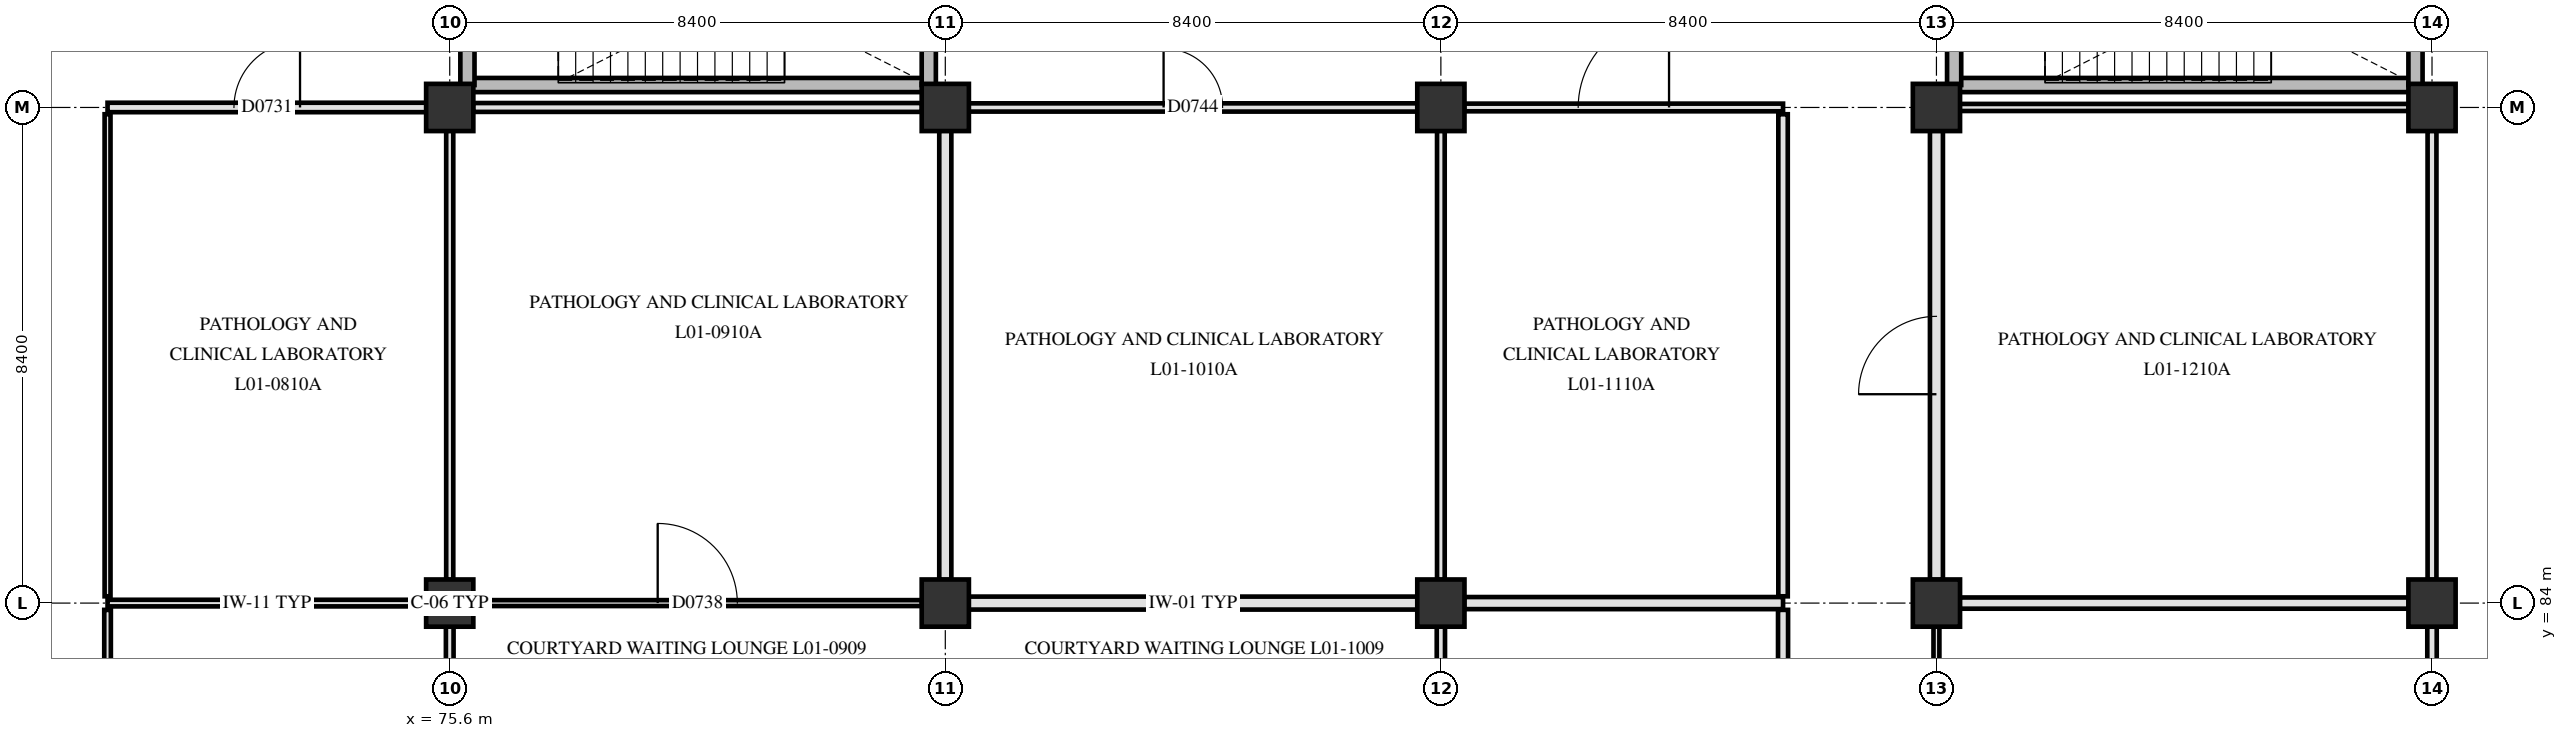
"""IFC4 building model, lengths in metres.
Left out: names, types, materials, properties, quantities, classifications, styles, units other than length and angle.
Written with IfcOpenShell. Run it as: python <this file> out.ifc"""

import sys

from ifc_helpers import new_model, si_unit, direction, frame, frame_2d, origin, origin_2d, place, context, subcontext, project, spatial, rectangle, circle, extrude, element, fill, save


model = new_model("IFC4")
c1 = context("Model", 3, precision=1e-05, world=origin(), true_north=direction((0.0, 1.0)))
c2 = subcontext(c1, "Body", "Model", "MODEL_VIEW")
j1 = project(units=[si_unit("LENGTHUNIT", "METRE"), si_unit("PLANEANGLEUNIT", "RADIAN")], contexts=[c1])
p1 = place(None, origin())
s1 = spatial("IfcSite", under=j1, at=p1, CompositionType="ELEMENT")
p2 = place(p1, origin())
s2 = spatial("IfcBuilding", under=s1, at=p2, CompositionType="ELEMENT")
p3 = place(p2, frame((0.0, 0.0, 4.8)))
s3 = spatial("IfcBuildingStorey", under=s2, at=p3, CompositionType="ELEMENT", Elevation=4.8)
p4 = place(p3, frame((75.6, 84.0, 0.0), z_axis=(0.0, 0.0, 1.0), x_axis=(1.0, 0.0, 0.0)))
e1 = element("IfcColumn", 1, at=p4, inside=s3, PredefinedType="COLUMN", context=c2, shape_type="SweptSolid", body=[
    extrude(circle(Radius=0.4, at=origin_2d()), origin(), (0.0, 0.0, 1.0), 4.5),
])
p5 = place(p3, frame((75.6, 92.4, 0.0), z_axis=(0.0, 0.0, 1.0), x_axis=(1.0, 0.0, 0.0)))
e2 = element("IfcColumn", 2, at=p5, inside=s3, PredefinedType="COLUMN", context=c2, shape_type="SweptSolid", body=[
    extrude(rectangle(XDim=0.8, YDim=0.8, at=origin_2d()), origin(), (0.0, 0.0, 1.0), 4.5),
])
p6 = place(p3, frame((84.0, 84.0, 0.0), z_axis=(0.0, 0.0, 1.0), x_axis=(1.0, 0.0, 0.0)))
e3 = element("IfcColumn", 3, at=p6, inside=s3, PredefinedType="COLUMN", context=c2, shape_type="SweptSolid", body=[
    extrude(circle(Radius=0.4, at=origin_2d()), origin(), (0.0, 0.0, 1.0), 4.5),
])
p7 = place(p3, frame((84.0, 92.4, 0.0), z_axis=(0.0, 0.0, 1.0), x_axis=(1.0, 0.0, 0.0)))
e4 = element("IfcColumn", 4, at=p7, inside=s3, PredefinedType="COLUMN", context=c2, shape_type="SweptSolid", body=[
    extrude(rectangle(XDim=0.8, YDim=0.8, at=origin_2d()), origin(), (0.0, 0.0, 1.0), 4.5),
])
p8 = place(p3, frame((92.4, 84.0, 0.0), z_axis=(0.0, 0.0, 1.0), x_axis=(1.0, 0.0, 0.0)))
e5 = element("IfcColumn", 5, at=p8, inside=s3, PredefinedType="COLUMN", context=c2, shape_type="SweptSolid", body=[
    extrude(circle(Radius=0.4, at=origin_2d()), origin(), (0.0, 0.0, 1.0), 4.5),
])
for number, where, z_axis, x_axis in (
    (6, (92.4, 92.4, 0.0), (0.0, 0.0, 1.0), (1.0, 0.0, 0.0)),
    (7, (100.8, 84.0, 0.0), (0.0, 0.0, 1.0), (1.0, 0.0, 0.0)),
    (8, (100.8, 92.4, 0.0), (0.0, 0.0, 1.0), (1.0, 0.0, 0.0)),
    (9, (109.2, 84.0, 0.0), (0.0, 0.0, 1.0), (1.0, 0.0, 0.0)),
    (10, (109.2, 92.4, 0.0), (0.0, 0.0, 1.0), (1.0, 0.0, 0.0)),
):
    element("IfcColumn", number, at=place(p3, frame(where, z_axis=z_axis, x_axis=x_axis)), inside=s3, PredefinedType="COLUMN", context=c2, shape_type="SweptSolid", body=[
        extrude(rectangle(XDim=0.8, YDim=0.8, at=origin_2d()), origin(), (0.0, 0.0, 1.0), 4.5),
    ])
p9 = place(p3, frame((101.1, 92.78, 0.0), z_axis=(0.0, 0.0, 1.0), x_axis=(1.0, 0.0, 0.0)))
e11 = element("IfcWall", 11, at=p9, inside=s3, PredefinedType="SHEAR", context=c2, shape_type="SweptSolid", body=[
    extrude(rectangle(XDim=7.82, YDim=0.24, at=frame_2d((3.91, 0.0))), origin(), (0.0, 0.0, 1.0), 4.15),
])
for number, where, z_axis, x_axis in (
    (12, (101.1, 92.78, 0.0), (0.0, 0.0, 1.0), (0.0, 1.0, 0.0)),
    (13, (108.92, 92.78, 0.0), (0.0, 0.0, 1.0), (0.0, 1.0, 0.0)),
):
    element("IfcWall", number, at=place(p3, frame(where, z_axis=z_axis, x_axis=x_axis)), inside=s3, PredefinedType="SHEAR", context=c2, shape_type="SweptSolid", body=[
        extrude(rectangle(XDim=3.32, YDim=0.24, at=frame_2d((1.66, 0.0))), origin(), (0.0, 0.0, 1.0), 4.15),
    ])
p10 = place(p3, frame((75.9, 92.78, 0.0), z_axis=(0.0, 0.0, 1.0), x_axis=(1.0, 0.0, 0.0)))
e14 = element("IfcWall", 14, at=p10, inside=s3, PredefinedType="SHEAR", context=c2, shape_type="SweptSolid", body=[
    extrude(rectangle(XDim=7.82, YDim=0.24, at=frame_2d((3.91, 0.0))), origin(), (0.0, 0.0, 1.0), 4.15),
])
for number, where, z_axis, x_axis in (
    (15, (75.9, 92.78, 0.0), (0.0, 0.0, 1.0), (0.0, 1.0, 0.0)),
    (16, (83.72, 92.78, 0.0), (0.0, 0.0, 1.0), (0.0, 1.0, 0.0)),
):
    element("IfcWall", number, at=place(p3, frame(where, z_axis=z_axis, x_axis=x_axis)), inside=s3, PredefinedType="SHEAR", context=c2, shape_type="SweptSolid", body=[
        extrude(rectangle(XDim=3.32, YDim=0.24, at=frame_2d((1.66, 0.0))), origin(), (0.0, 0.0, 1.0), 4.15),
    ])
p11 = place(p3, frame((69.8, 84.0, 0.0), z_axis=(0.0, 0.0, 1.0), x_axis=(1.0, 0.0, 0.0)))
e17 = element("IfcWall", 17, at=p11, inside=s3, PredefinedType="PARTITIONING", context=c2, shape_type="SweptSolid", body=[
    extrude(rectangle(XDim=5.405, YDim=0.112, at=frame_2d((2.703, 0.0))), origin(), (0.0, 0.0, 1.0), 3.54),
])
p12 = place(p3, frame((75.995, 84.0, 0.0), z_axis=(0.0, 0.0, 1.0), x_axis=(1.0, 0.0, 0.0)))
e18 = element("IfcWall", 18, at=p12, inside=s3, PredefinedType="PARTITIONING", context=c2, shape_type="SweptSolid", body=[
    extrude(rectangle(XDim=7.61, YDim=0.1, at=frame_2d((3.805, 0.0))), origin(), (0.0, 0.0, 1.0), 3.54),
])
p13 = place(p12, frame((3.13, 0.0, 0.0)))
e19 = element("IfcOpeningElement", 19, at=p13, cuts=e18, PredefinedType="OPENING", context=c2, shape_type="SweptSolid", body=[
    extrude(rectangle(XDim=1.35, YDim=2.2, at=frame_2d((0.675, 1.1))), frame((0.0, 0.06, 0.0), z_axis=(0.0, -1.0, 0.0), x_axis=(1.0, 0.0, 0.0)), (0.0, 0.0, 1.0), 0.12),
])
p14 = place(p3, frame((84.395, 84.0, 0.0), z_axis=(0.0, 0.0, 1.0), x_axis=(1.0, 0.0, 0.0)))
e20 = element("IfcWall", 20, at=p14, inside=s3, PredefinedType="PARTITIONING", context=c2, shape_type="SweptSolid", body=[
    extrude(rectangle(XDim=7.61, YDim=0.22, at=frame_2d((3.805, 0.0))), origin(), (0.0, 0.0, 1.0), 3.54),
])
p15 = place(p3, frame((92.795, 84.0, 0.0), z_axis=(0.0, 0.0, 1.0), x_axis=(1.0, 0.0, 0.0)))
e21 = element("IfcWall", 21, at=p15, inside=s3, PredefinedType="PARTITIONING", context=c2, shape_type="SweptSolid", body=[
    extrude(rectangle(XDim=5.405, YDim=0.205, at=frame_2d((2.703, 0.0))), origin(), (0.0, 0.0, 1.0), 3.54),
])
p16 = place(p3, frame((101.195, 84.0, 0.0), z_axis=(0.0, 0.0, 1.0), x_axis=(1.0, 0.0, 0.0)))
e22 = element("IfcWall", 22, at=p16, inside=s3, PredefinedType="PARTITIONING", context=c2, shape_type="SweptSolid", body=[
    extrude(rectangle(XDim=7.61, YDim=0.19, at=frame_2d((3.805, 0.0))), origin(), (0.0, 0.0, 1.0), 3.54),
])
p17 = place(p3, frame((69.8, 92.4, 0.0), z_axis=(0.0, 0.0, 1.0), x_axis=(1.0, 0.0, 0.0)))
e23 = element("IfcWall", 23, at=p17, inside=s3, PredefinedType="PARTITIONING", context=c2, shape_type="SweptSolid", body=[
    extrude(rectangle(XDim=5.405, YDim=0.16, at=frame_2d((2.703, 0.0))), origin(), (0.0, 0.0, 1.0), 3.54),
])
p18 = place(p17, frame((2.143, 0.0, 0.0)))
e24 = element("IfcOpeningElement", 24, at=p18, cuts=e23, PredefinedType="OPENING", context=c2, shape_type="SweptSolid", body=[
    extrude(rectangle(XDim=1.12, YDim=2.18, at=frame_2d((0.56, 1.09))), frame((0.0, 0.09, 0.0), z_axis=(0.0, -1.0, 0.0), x_axis=(1.0, 0.0, 0.0)), (0.0, 0.0, 1.0), 0.18),
])
p19 = place(p3, frame((75.995, 92.4, 0.0), z_axis=(0.0, 0.0, 1.0), x_axis=(1.0, 0.0, 0.0)))
e25 = element("IfcWall", 25, at=p19, inside=s3, PredefinedType="PARTITIONING", context=c2, shape_type="SweptSolid", body=[
    extrude(rectangle(XDim=7.61, YDim=0.15, at=frame_2d((3.805, 0.0))), origin(), (0.0, 0.0, 1.0), 3.54),
])
p20 = place(p3, frame((84.395, 92.4, 0.0), z_axis=(0.0, 0.0, 1.0), x_axis=(1.0, 0.0, 0.0)))
e26 = element("IfcWall", 26, at=p20, inside=s3, PredefinedType="PARTITIONING", context=c2, shape_type="SweptSolid", body=[
    extrude(rectangle(XDim=7.61, YDim=0.14, at=frame_2d((3.805, 0.0))), origin(), (0.0, 0.0, 1.0), 3.54),
])
p21 = place(p20, frame((3.305, 0.0, 0.0)))
e27 = element("IfcOpeningElement", 27, at=p21, cuts=e26, PredefinedType="OPENING", context=c2, shape_type="SweptSolid", body=[
    extrude(rectangle(XDim=1.0, YDim=2.15, at=frame_2d((0.5, 1.075))), frame((0.0, 0.08, 0.0), z_axis=(0.0, -1.0, 0.0), x_axis=(1.0, 0.0, 0.0)), (0.0, 0.0, 1.0), 0.16),
])
p22 = place(p3, frame((92.795, 92.4, 0.0), z_axis=(0.0, 0.0, 1.0), x_axis=(1.0, 0.0, 0.0)))
e28 = element("IfcWall", 28, at=p22, inside=s3, PredefinedType="PARTITIONING", context=c2, shape_type="SweptSolid", body=[
    extrude(rectangle(XDim=5.405, YDim=0.13, at=frame_2d((2.703, 0.0))), origin(), (0.0, 0.0, 1.0), 3.54),
])
p23 = place(p22, frame((1.933, 0.0, 0.0)))
e29 = element("IfcOpeningElement", 29, at=p23, cuts=e28, PredefinedType="OPENING", context=c2, shape_type="SweptSolid", body=[
    extrude(rectangle(XDim=1.54, YDim=2.24, at=frame_2d((0.77, 1.12))), frame((0.0, 0.075, 0.0), z_axis=(0.0, -1.0, 0.0), x_axis=(1.0, 0.0, 0.0)), (0.0, 0.0, 1.0), 0.15),
])
p24 = place(p3, frame((101.195, 92.4, 0.0), z_axis=(0.0, 0.0, 1.0), x_axis=(1.0, 0.0, 0.0)))
e30 = element("IfcWall", 30, at=p24, inside=s3, PredefinedType="PARTITIONING", context=c2, shape_type="SweptSolid", body=[
    extrude(rectangle(XDim=7.61, YDim=0.12, at=frame_2d((3.805, 0.0))), origin(), (0.0, 0.0, 1.0), 3.54),
])
p25 = place(p3, frame((69.8, 78.315, 0.0), z_axis=(0.0, 0.0, 1.0), x_axis=(0.0, 1.0, 0.0)))
e31 = element("IfcWall", 31, at=p25, inside=s3, PredefinedType="PARTITIONING", context=c2, shape_type="SweptSolid", body=[
    extrude(rectangle(XDim=5.57, YDim=0.112, at=frame_2d((2.785, 0.0))), origin(), (0.0, 0.0, 1.0), 3.54),
])
p26 = place(p3, frame((69.8, 84.115, 0.0), z_axis=(0.0, 0.0, 1.0), x_axis=(0.0, 1.0, 0.0)))
e32 = element("IfcWall", 32, at=p26, inside=s3, PredefinedType="PARTITIONING", context=c2, shape_type="SweptSolid", body=[
    extrude(rectangle(XDim=8.17, YDim=0.1, at=frame_2d((4.085, 0.0))), origin(), (0.0, 0.0, 1.0), 3.54),
])
p27 = place(p3, frame((75.6, 78.315, 0.0), z_axis=(0.0, 0.0, 1.0), x_axis=(0.0, 1.0, 0.0)))
e33 = element("IfcWall", 33, at=p27, inside=s3, PredefinedType="PARTITIONING", context=c2, shape_type="SweptSolid", body=[
    extrude(rectangle(XDim=5.29, YDim=0.13, at=frame_2d((2.645, 0.0))), origin(), (0.0, 0.0, 1.0), 3.59),
])
p28 = place(p3, frame((75.6, 84.395, 0.0), z_axis=(0.0, 0.0, 1.0), x_axis=(0.0, 1.0, 0.0)))
e34 = element("IfcWall", 34, at=p28, inside=s3, PredefinedType="PARTITIONING", context=c2, shape_type="SweptSolid", body=[
    extrude(rectangle(XDim=7.61, YDim=0.12, at=frame_2d((3.805, 0.0))), origin(), (0.0, 0.0, 1.0), 3.59),
])
p29 = place(p3, frame((84.0, 84.395, 0.0), z_axis=(0.0, 0.0, 1.0), x_axis=(0.0, 1.0, 0.0)))
e35 = element("IfcWall", 35, at=p29, inside=s3, PredefinedType="PARTITIONING", context=c2, shape_type="SweptSolid", body=[
    extrude(rectangle(XDim=7.61, YDim=0.205, at=frame_2d((3.805, 0.0))), origin(), (0.0, 0.0, 1.0), 3.59),
])
p30 = place(p3, frame((92.4, 78.315, 0.0), z_axis=(0.0, 0.0, 1.0), x_axis=(0.0, 1.0, 0.0)))
e36 = element("IfcWall", 36, at=p30, inside=s3, PredefinedType="PARTITIONING", context=c2, shape_type="SweptSolid", body=[
    extrude(rectangle(XDim=5.29, YDim=0.14, at=frame_2d((2.645, 0.0))), origin(), (0.0, 0.0, 1.0), 3.59),
])
p31 = place(p3, frame((92.4, 84.395, 0.0), z_axis=(0.0, 0.0, 1.0), x_axis=(0.0, 1.0, 0.0)))
e37 = element("IfcWall", 37, at=p31, inside=s3, PredefinedType="PARTITIONING", context=c2, shape_type="SweptSolid", body=[
    extrude(rectangle(XDim=7.61, YDim=0.13, at=frame_2d((3.805, 0.0))), origin(), (0.0, 0.0, 1.0), 3.59),
])
p32 = place(p3, frame((98.2, 78.315, 0.0), z_axis=(0.0, 0.0, 1.0), x_axis=(0.0, 1.0, 0.0)))
e38 = element("IfcWall", 38, at=p32, inside=s3, PredefinedType="PARTITIONING", context=c2, shape_type="SweptSolid", body=[
    extrude(rectangle(XDim=5.57, YDim=0.17, at=frame_2d((2.785, 0.0))), origin(), (0.0, 0.0, 1.0), 3.54),
])
p33 = place(p3, frame((98.2, 84.115, 0.0), z_axis=(0.0, 0.0, 1.0), x_axis=(0.0, 1.0, 0.0)))
e39 = element("IfcWall", 39, at=p33, inside=s3, PredefinedType="PARTITIONING", context=c2, shape_type="SweptSolid", body=[
    extrude(rectangle(XDim=8.17, YDim=0.16, at=frame_2d((4.085, 0.0))), origin(), (0.0, 0.0, 1.0), 3.54),
])
p34 = place(p3, frame((100.8, 78.315, 0.0), z_axis=(0.0, 0.0, 1.0), x_axis=(0.0, 1.0, 0.0)))
e40 = element("IfcWall", 40, at=p34, inside=s3, PredefinedType="PARTITIONING", context=c2, shape_type="SweptSolid", body=[
    extrude(rectangle(XDim=5.29, YDim=0.1, at=frame_2d((2.645, 0.0))), origin(), (0.0, 0.0, 1.0), 3.59),
])
p35 = place(p3, frame((100.8, 84.395, 0.0), z_axis=(0.0, 0.0, 1.0), x_axis=(0.0, 1.0, 0.0)))
e41 = element("IfcWall", 41, at=p35, inside=s3, PredefinedType="PARTITIONING", context=c2, shape_type="SweptSolid", body=[
    extrude(rectangle(XDim=7.61, YDim=0.22, at=frame_2d((3.805, 0.0))), origin(), (0.0, 0.0, 1.0), 3.59),
])
p36 = place(p35, frame((3.145, 0.0, 0.0)))
e42 = element("IfcOpeningElement", 42, at=p36, cuts=e41, PredefinedType="OPENING", context=c2, shape_type="SweptSolid", body=[
    extrude(rectangle(XDim=1.32, YDim=2.18, at=frame_2d((0.66, 1.09))), frame((0.0, 0.12, 0.0), z_axis=(0.0, -1.0, 0.0), x_axis=(1.0, 0.0, 0.0)), (0.0, 0.0, 1.0), 0.24),
])
p37 = place(p3, frame((109.2, 78.315, 0.0), z_axis=(0.0, 0.0, 1.0), x_axis=(0.0, 1.0, 0.0)))
e43 = element("IfcWall", 43, at=p37, inside=s3, PredefinedType="PARTITIONING", context=c2, shape_type="SweptSolid", body=[
    extrude(rectangle(XDim=5.29, YDim=0.16, at=frame_2d((2.645, 0.0))), origin(), (0.0, 0.0, 1.0), 3.59),
])
p38 = place(p3, frame((109.2, 84.395, 0.0), z_axis=(0.0, 0.0, 1.0), x_axis=(0.0, 1.0, 0.0)))
e44 = element("IfcWall", 44, at=p38, inside=s3, PredefinedType="PARTITIONING", context=c2, shape_type="SweptSolid", body=[
    extrude(rectangle(XDim=7.61, YDim=0.15, at=frame_2d((3.805, 0.0))), origin(), (0.0, 0.0, 1.0), 3.59),
])
p39 = place(p18, origin())
e45 = element("IfcDoor", 45, at=p39, inside=s3, OperationType="SINGLE_SWING_RIGHT", PredefinedType="DOOR", context=c2, shape_type="SweptSolid", body=[
    extrude(rectangle(XDim=1.12, YDim=2.18, at=frame_2d((0.56, 1.09))), frame((0.0, 0.025, 0.0), z_axis=(0.0, -1.0, 0.0), x_axis=(1.0, 0.0, 0.0)), (0.0, 0.0, 1.0), 0.05),
])
fill(e24, e45)
p40 = place(p13, origin())
e46 = element("IfcDoor", 46, at=p40, inside=s3, OperationType="SINGLE_SWING_LEFT", PredefinedType="DOOR", context=c2, shape_type="SweptSolid", body=[
    extrude(rectangle(XDim=1.35, YDim=2.2, at=frame_2d((0.675, 1.1))), frame((0.0, 0.025, 0.0), z_axis=(0.0, -1.0, 0.0), x_axis=(1.0, 0.0, 0.0)), (0.0, 0.0, 1.0), 0.05),
])
fill(e19, e46)
p41 = place(p21, origin())
e47 = element("IfcDoor", 47, at=p41, inside=s3, OperationType="SINGLE_SWING_LEFT", PredefinedType="DOOR", context=c2, shape_type="SweptSolid", body=[
    extrude(rectangle(XDim=1.0, YDim=2.15, at=frame_2d((0.5, 1.075))), frame((0.0, 0.025, 0.0), z_axis=(0.0, -1.0, 0.0), x_axis=(1.0, 0.0, 0.0)), (0.0, 0.0, 1.0), 0.05),
])
fill(e27, e47)
p42 = place(p23, origin())
e48 = element("IfcDoor", 48, at=p42, inside=s3, OperationType="SINGLE_SWING_RIGHT", PredefinedType="DOOR", context=c2, shape_type="SweptSolid", body=[
    extrude(rectangle(XDim=1.54, YDim=2.24, at=frame_2d((0.77, 1.12))), frame((0.0, 0.025, 0.0), z_axis=(0.0, -1.0, 0.0), x_axis=(1.0, 0.0, 0.0)), (0.0, 0.0, 1.0), 0.05),
])
fill(e29, e48)
p43 = place(p36, origin())
e49 = element("IfcDoor", 49, at=p43, inside=s3, OperationType="SINGLE_SWING_LEFT", PredefinedType="DOOR", context=c2, shape_type="SweptSolid", body=[
    extrude(rectangle(XDim=1.32, YDim=2.18, at=frame_2d((0.66, 1.09))), frame((0.0, 0.025, 0.0), z_axis=(0.0, -1.0, 0.0), x_axis=(1.0, 0.0, 0.0)), (0.0, 0.0, 1.0), 0.05),
])
fill(e42, e49)
save(model, sys.argv[1])
